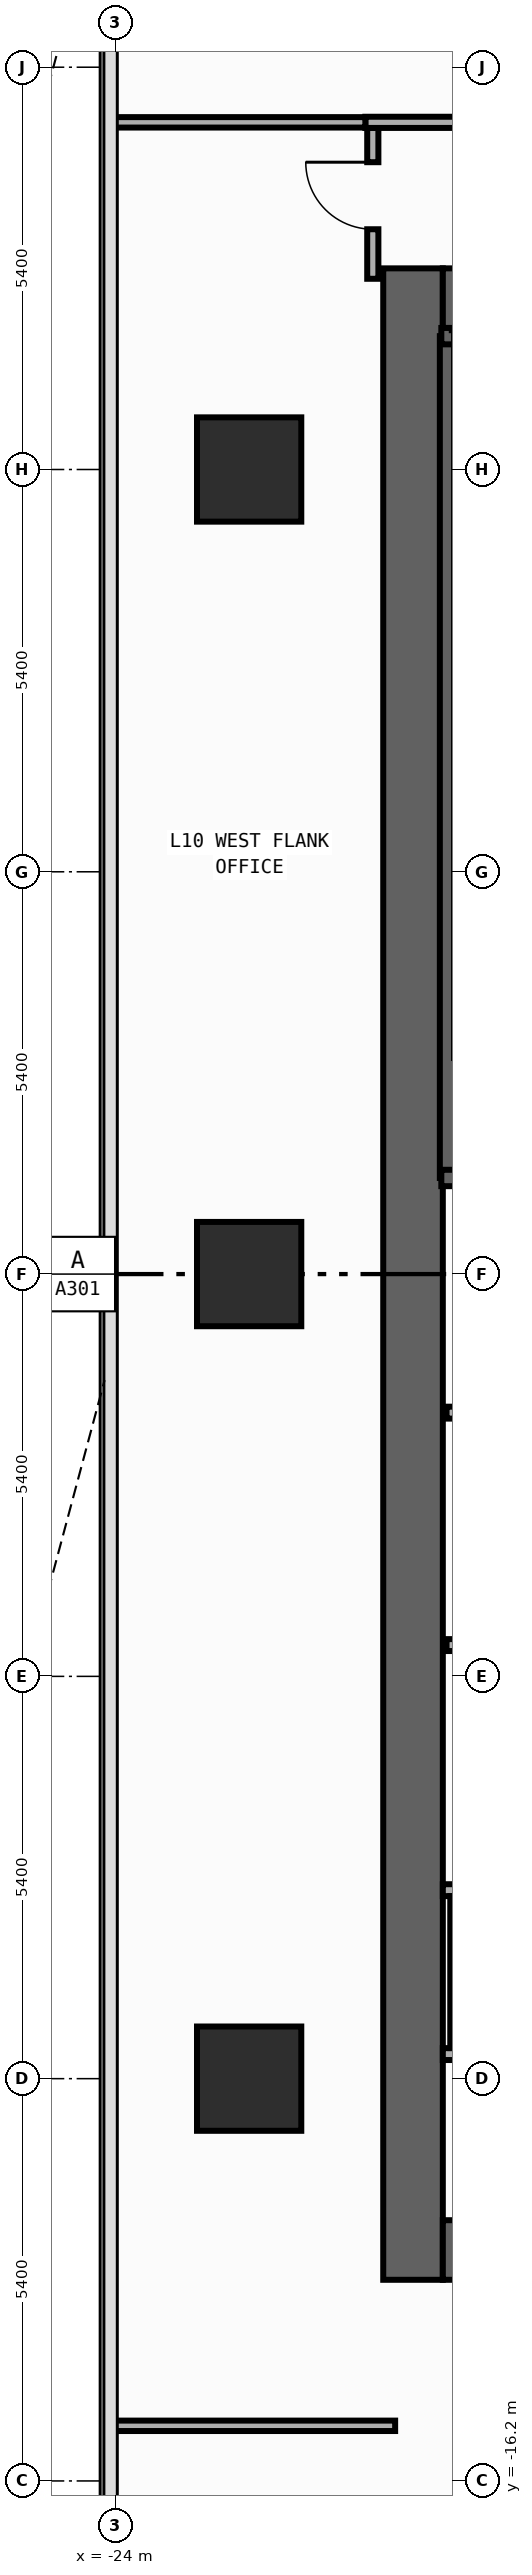
"""IFC4 building model, lengths in metres.
Left out: names, types, materials, properties, quantities, classifications, styles, units other than length and angle.
Written with IfcOpenShell. Run it as: python <this file> out.ifc"""

import sys

from ifc_helpers import new_model, si_unit, direction, frame, frame_2d, origin, origin_2d, place, context, subcontext, project, spatial, rectangle, extrude, element, fill, save


model = new_model("IFC4")
c1 = context("Model", 3, precision=1e-05, world=origin(), true_north=direction((0.0, 1.0)))
c2 = subcontext(c1, "Body", "Model", "MODEL_VIEW")
j1 = project(units=[si_unit("LENGTHUNIT", "METRE"), si_unit("PLANEANGLEUNIT", "RADIAN")], contexts=[c1])
p1 = place(None, origin())
s1 = spatial("IfcSite", under=j1, at=p1, CompositionType="ELEMENT")
p2 = place(p1, origin())
s2 = spatial("IfcBuilding", under=s1, at=p2, CompositionType="ELEMENT")
p3 = place(p2, frame((0.0, 0.0, 42.8)))
s3 = spatial("IfcBuildingStorey", under=s2, at=p3, CompositionType="ELEMENT", Elevation=42.8)
p4 = place(p3, frame((-20.0, -13.5, 0.0), z_axis=(0.0, 0.0, 1.0), x_axis=(0.0, 1.0, 0.0)))
e1 = element("IfcWall", 1, at=p4, inside=s3, PredefinedType="SHEAR", context=c2, shape_type="SweptSolid", body=[
    extrude(rectangle(XDim=27.0, YDim=0.8, at=frame_2d((13.5, 0.0))), origin(), (0.0, 0.0, 1.0), 3.94),
])
for number, where, z_axis, x_axis in (
    (2, (-19.6, -13.1, 0.0), (0.0, 0.0, 1.0), (1.0, 0.0, 0.0)),
    (3, (-19.6, 13.1, 0.0), (0.0, 0.0, 1.0), (1.0, 0.0, 0.0)),
):
    element("IfcWall", number, at=place(p3, frame(where, z_axis=z_axis, x_axis=x_axis)), inside=s3, PredefinedType="SHEAR", context=c2, shape_type="SweptSolid", body=[
        extrude(rectangle(XDim=6.8, YDim=0.8, at=frame_2d((3.4, 0.0))), origin(), (0.0, 0.0, 1.0), 3.94),
    ])
p5 = place(p3, frame((-19.53, 1.29, 0.0), z_axis=(0.0, 0.0, 1.0), x_axis=(0.0, 1.0, 0.0)))
e4 = element("IfcWall", 4, at=p5, inside=s3, PredefinedType="SHEAR", context=c2, shape_type="SweptSolid", body=[
    extrude(rectangle(XDim=11.3, YDim=0.22, at=frame_2d((5.65, 0.0))), origin(), (0.0, 0.0, 1.0), 3.94),
])
p6 = place(p3, frame((-19.62, 12.59, 0.0), z_axis=(0.0, 0.0, 1.0), x_axis=(1.0, 0.0, 0.0)))
e5 = element("IfcWall", 5, at=p6, inside=s3, PredefinedType="SHEAR", context=c2, shape_type="SweptSolid", body=[
    extrude(rectangle(XDim=3.915, YDim=0.22, at=frame_2d((1.958, 0.0))), origin(), (0.0, 0.0, 1.0), 3.94),
])
p7 = place(p3, frame((-19.62, 1.29, 0.0), z_axis=(0.0, 0.0, 1.0), x_axis=(1.0, 0.0, 0.0)))
e6 = element("IfcWall", 6, at=p7, inside=s3, PredefinedType="SHEAR", context=c2, shape_type="SweptSolid", body=[
    extrude(rectangle(XDim=3.915, YDim=0.22, at=frame_2d((1.958, 0.0))), origin(), (0.0, 0.0, 1.0), 3.94),
])
p8 = place(p7, frame((1.08, 0.0, 0.0)))
e7 = element("IfcOpeningElement", 7, at=p8, cuts=e6, PredefinedType="OPENING", context=c2, shape_type="SweptSolid", body=[
    extrude(rectangle(XDim=1.1, YDim=2.2, at=frame_2d((0.55, 1.1))), frame((0.0, 0.12, 0.0), z_axis=(0.0, -1.0, 0.0), x_axis=(1.0, 0.0, 0.0)), (0.0, 0.0, 1.0), 0.24),
])
for number, where, z_axis, x_axis in (
    (8, (-22.2, -10.8, 0.0), (0.0, 0.0, 1.0), (1.0, 0.0, 0.0)),
    (9, (-22.2, 0.0, 0.0), (0.0, 0.0, 1.0), (1.0, 0.0, 0.0)),
    (10, (-22.2, 10.8, 0.0), (0.0, 0.0, 1.0), (1.0, 0.0, 0.0)),
):
    element("IfcColumn", number, at=place(p3, frame(where, z_axis=z_axis, x_axis=x_axis)), inside=s3, PredefinedType="COLUMN", context=c2, shape_type="SweptSolid", body=[
        extrude(rectangle(XDim=1.4, YDim=1.4, at=origin_2d()), origin(), (0.0, 0.0, 1.0), 4.2),
    ])
p9 = place(p3, frame((-19.55, -1.86, 0.0), z_axis=(0.0, 0.0, 1.0), x_axis=(1.0, 0.0, 0.0)))
e11 = element("IfcWall", 11, at=p9, inside=s3, PredefinedType="STANDARD", context=c2, shape_type="SweptSolid", body=[
    extrude(rectangle(XDim=3.8, YDim=0.16, at=frame_2d((1.9, 0.0))), origin(), (0.0, 0.0, 1.0), 3.94),
])
p10 = place(p9, frame((1.18, 0.0, 0.0)))
e12 = element("IfcOpeningElement", 12, at=p10, cuts=e11, PredefinedType="OPENING", context=c2, shape_type="SweptSolid", body=[
    extrude(rectangle(XDim=1.15, YDim=2.2, at=frame_2d((0.575, 1.1))), frame((0.0, 0.09, 0.0), z_axis=(0.0, -1.0, 0.0), x_axis=(1.0, 0.0, 0.0)), (0.0, 0.0, 1.0), 0.18),
])
p11 = place(p3, frame((-19.55, -4.98, 0.0), z_axis=(0.0, 0.0, 1.0), x_axis=(1.0, 0.0, 0.0)))
e13 = element("IfcWall", 13, at=p11, inside=s3, PredefinedType="STANDARD", context=c2, shape_type="SweptSolid", body=[
    extrude(rectangle(XDim=3.8, YDim=0.16, at=frame_2d((1.9, 0.0))), origin(), (0.0, 0.0, 1.0), 3.94),
])
for number, where, z_axis, x_axis in (
    (14, (-19.6, -10.47, 0.0), (0.0, 0.0, 1.0), (1.0, 0.0, 0.0)),
    (15, (-19.6, -8.27, 0.0), (0.0, 0.0, 1.0), (1.0, 0.0, 0.0)),
):
    element("IfcWall", number, at=place(p3, frame(where, z_axis=z_axis, x_axis=x_axis)), inside=s3, PredefinedType="PARTITIONING", context=c2, shape_type="SweptSolid", body=[
        extrude(rectangle(XDim=2.29, YDim=0.16, at=frame_2d((1.145, 0.0))), origin(), (0.0, 0.0, 1.0), 3.94),
    ])
p12 = place(p3, frame((-20.54, 13.36, 0.0), z_axis=(0.0, 0.0, 1.0), x_axis=(0.0, 1.0, 0.0)))
e16 = element("IfcWall", 16, at=p12, inside=s3, PredefinedType="PARTITIONING", context=c2, shape_type="SweptSolid", body=[
    extrude(rectangle(XDim=2.025, YDim=0.15, at=frame_2d((1.012, 0.0))), origin(), (0.0, 0.0, 1.0), 3.94),
])
p13 = place(p12, frame((0.665, 0.0, 0.0)))
e17 = element("IfcOpeningElement", 17, at=p13, cuts=e16, PredefinedType="OPENING", context=c2, shape_type="SweptSolid", body=[
    extrude(rectangle(XDim=0.9, YDim=2.15, at=frame_2d((0.45, 1.075))), frame((0.0, 0.085, 0.0), z_axis=(0.0, -1.0, 0.0), x_axis=(1.0, 0.0, 0.0)), (0.0, 0.0, 1.0), 0.17),
])
p14 = place(p3, frame((-20.64, 15.46, 0.0), z_axis=(0.0, 0.0, 1.0), x_axis=(1.0, 0.0, 0.0)))
e18 = element("IfcWall", 18, at=p14, inside=s3, PredefinedType="PARTITIONING", context=c2, shape_type="SweptSolid", body=[
    extrude(rectangle(XDim=8.65, YDim=0.15, at=frame_2d((4.325, 0.0))), origin(), (0.0, 0.0, 1.0), 3.94),
])
p15 = place(p14, frame((2.871, 0.0, 0.0)))
e19 = element("IfcOpeningElement", 19, at=p15, cuts=e18, PredefinedType="OPENING", context=c2, shape_type="SweptSolid", body=[
    extrude(rectangle(XDim=0.9, YDim=2.15, at=frame_2d((0.45, 1.075))), frame((0.0, 0.085, 0.0), z_axis=(0.0, -1.0, 0.0), x_axis=(1.0, 0.0, 0.0)), (0.0, 0.0, 1.0), 0.17),
])
p16 = place(p3, frame((-24.055, 15.46, 0.0), z_axis=(0.0, 0.0, 1.0), x_axis=(1.0, 0.0, 0.0)))
e20 = element("IfcWall", 20, at=p16, inside=s3, PredefinedType="PARTITIONING", context=c2, shape_type="SweptSolid", body=[
    extrude(rectangle(XDim=3.415, YDim=0.14, at=frame_2d((1.708, 0.0))), origin(), (0.0, 0.0, 1.0), 3.94),
])
p17 = place(p3, frame((-24.055, -15.46, 0.0), z_axis=(0.0, 0.0, 1.0), x_axis=(1.0, 0.0, 0.0)))
e21 = element("IfcWall", 21, at=p17, inside=s3, PredefinedType="PARTITIONING", context=c2, shape_type="SweptSolid", body=[
    extrude(rectangle(XDim=3.815, YDim=0.14, at=frame_2d((1.907, 0.0))), origin(), (0.0, 0.0, 1.0), 3.94),
])
p18 = place(p3, frame((-19.45, -10.39, 0.0), z_axis=(0.0, 0.0, 1.0), x_axis=(0.0, 1.0, 0.0)))
e22 = element("IfcWall", 22, at=p18, inside=s3, PredefinedType="PARTITIONING", context=c2, shape_type="SweptSolid", body=[
    extrude(rectangle(XDim=2.04, YDim=0.1, at=frame_2d((1.02, 0.0))), origin(), (0.0, 0.0, 1.0), 3.94),
])
p19 = place(p13, origin())
e23 = element("IfcDoor", 23, at=p19, inside=s3, OperationType="SINGLE_SWING_RIGHT", PredefinedType="DOOR", context=c2, shape_type="SweptSolid", body=[
    extrude(rectangle(XDim=0.9, YDim=2.15, at=frame_2d((0.45, 1.075))), frame((0.0, 0.025, 0.0), z_axis=(0.0, -1.0, 0.0), x_axis=(1.0, 0.0, 0.0)), (0.0, 0.0, 1.0), 0.05),
])
fill(e17, e23)
save(model, sys.argv[1])
